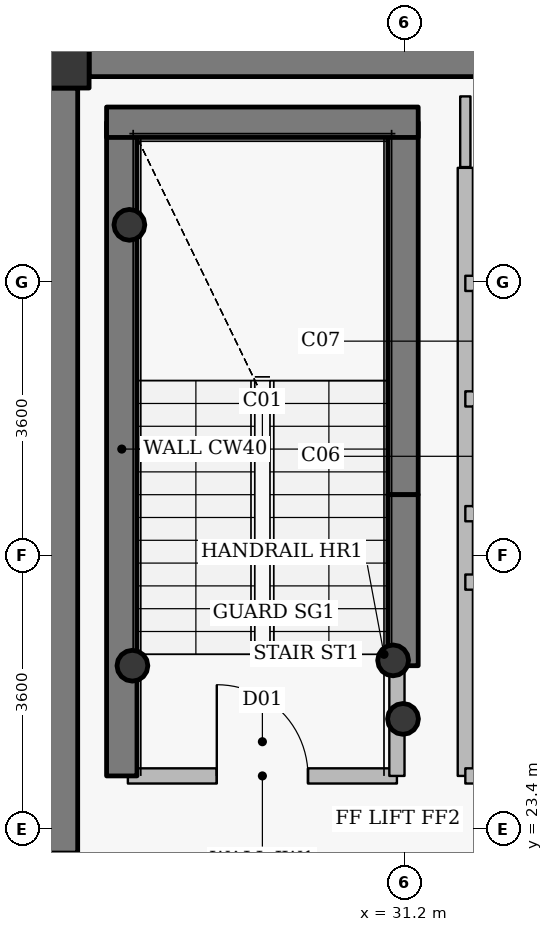
"""IFC4 building model, lengths in metres.
Left out: names, types, materials, properties, quantities, classifications, styles, units other than length and angle.
Written with IfcOpenShell. Run it as: python <this file> out.ifc"""

import sys

from ifc_helpers import new_model, si_unit, direction, frame, frame_2d, origin, origin_2d, place, context, subcontext, project, spatial, rectangle, hollow_circle, extrude, source, transform, mapped, element, fill, save


model = new_model("IFC4")
c1 = context("Model", 3, precision=1e-05, world=origin(), true_north=direction((0.0, 1.0)))
c2 = subcontext(c1, "Body", "Model", "MODEL_VIEW")
j1 = project(units=[si_unit("LENGTHUNIT", "METRE"), si_unit("PLANEANGLEUNIT", "RADIAN")], contexts=[c1])
p1 = place(None, origin())
s1 = spatial("IfcSite", under=j1, at=p1, CompositionType="ELEMENT")
p2 = place(p1, origin())
s2 = spatial("IfcBuilding", under=s1, at=p2, CompositionType="ELEMENT")
p3 = place(p2, frame((0.0, 0.0, 210.3)))
s3 = spatial("IfcBuildingStorey", under=s2, at=p3, CompositionType="ELEMENT", Elevation=210.3)
p4 = place(p3, frame((26.55, 33.65, 0.0), z_axis=(0.0, 0.0, 1.0), x_axis=(1.0, 0.0, 0.0)))
e1 = element("IfcColumn", 1, at=p4, inside=s3, PredefinedType="COLUMN", context=c2, shape_type="SweptSolid", body=[
    extrude(rectangle(XDim=1.0, YDim=1.0, at=origin_2d()), origin(), (0.0, 0.0, 1.0), 3.75),
])
p5 = place(p3, frame((27.48, 24.1, 0.0), z_axis=(0.0, 0.0, 1.0), x_axis=(0.0, 1.0, 0.0)))
e2 = element("IfcWall", 2, at=p5, inside=s3, PredefinedType="SHEAR", context=c2, shape_type="SweptSolid", body=[
    extrude(rectangle(XDim=8.6, YDim=0.4, at=frame_2d((4.3, 0.0))), origin(), (0.0, 0.0, 1.0), 3.75),
])
p6 = place(p3, frame((31.18, 27.8, 0.0), z_axis=(0.0, 0.0, 1.0), x_axis=(0.0, 1.0, 0.0)))
e3 = element("IfcWall", 3, at=p6, inside=s3, PredefinedType="SHEAR", context=c2, shape_type="SweptSolid", body=[
    extrude(rectangle(XDim=4.9, YDim=0.4, at=frame_2d((2.45, 0.0))), origin(), (0.0, 0.0, 1.0), 3.75),
])
p7 = place(p3, frame((27.28, 32.7, 0.0), z_axis=(0.0, 0.0, 1.0), x_axis=(1.0, 0.0, 0.0)))
e4 = element("IfcWall", 4, at=p7, inside=s3, PredefinedType="SHEAR", context=c2, shape_type="SweptSolid", body=[
    extrude(rectangle(XDim=4.1, YDim=0.4, at=frame_2d((2.05, 0.0))), origin(), (0.0, 0.0, 1.0), 3.75),
])
for number, where, z_axis, x_axis in (
    (5, (27.58, 31.35, 0.0), (0.0, 0.0, 1.0), (1.0, 0.0, 0.0)),
    (6, (31.05, 25.62, 0.0), (0.0, 0.0, 1.0), (1.0, 0.0, 0.0)),
    (7, (31.18, 24.85, 0.0), (0.0, 0.0, 1.0), (1.0, 0.0, 0.0)),
    (8, (27.62, 25.55, 0.0), (0.0, 0.0, 1.0), (1.0, 0.0, 0.0)),
):
    element("IfcColumn", number, at=place(p3, frame(where, z_axis=z_axis, x_axis=x_axis)), inside=s3, PredefinedType="COLUMN", context=c2, shape_type="SweptSolid", body=[
        extrude(hollow_circle(Radius=0.203, WallThickness=0.016, at=origin_2d()), origin(), (0.0, 0.0, 1.0), 3.75),
    ])
p8 = place(p3, frame((27.05, 33.65, 0.0), z_axis=(0.0, 0.0, 1.0), x_axis=(1.0, 0.0, 0.0)))
e9 = element("IfcWall", 9, at=p8, inside=s3, PredefinedType="SHEAR", context=c2, shape_type="SweptSolid", body=[
    extrude(rectangle(XDim=17.9, YDim=0.7, at=frame_2d((8.95, 0.0))), origin(), (0.0, 0.0, 1.0), 3.05),
])
p9 = place(p8, frame((13.675, 0.0, 0.0)))
e10 = element("IfcOpeningElement", 10, at=p9, cuts=e9, PredefinedType="OPENING", context=c2, shape_type="SweptSolid", body=[
    extrude(rectangle(XDim=1.15, YDim=2.15, at=origin_2d()), frame((0.575, 0.36, 1.075), z_axis=(0.0, -1.0, 0.0), x_axis=(1.0, 0.0, 0.0)), (0.0, 0.0, 1.0), 0.72),
])
p10 = place(p3, frame((26.55, 20.85, 0.0), z_axis=(0.0, 0.0, 1.0), x_axis=(0.0, 1.0, 0.0)))
e11 = element("IfcWall", 11, at=p10, inside=s3, PredefinedType="SHEAR", context=c2, shape_type="SweptSolid", body=[
    extrude(rectangle(XDim=12.3, YDim=0.7, at=frame_2d((6.15, 0.0))), origin(), (0.0, 0.0, 1.0), 3.05),
])
p11 = place(p10, frame((1.085, 0.0, 0.0)))
e12 = element("IfcOpeningElement", 12, at=p11, cuts=e11, PredefinedType="OPENING", context=c2, shape_type="SweptSolid", body=[
    extrude(rectangle(XDim=1.15, YDim=2.15, at=origin_2d()), frame((0.575, 0.36, 1.075), z_axis=(0.0, -1.0, 0.0), x_axis=(1.0, 0.0, 0.0)), (0.0, 0.0, 1.0), 0.72),
])
p12 = place(p3, frame((31.18, 25.55, 0.0), z_axis=(0.0, 0.0, 1.0), x_axis=(0.0, 1.0, 0.0)))
e13 = element("IfcWall", 13, at=p12, inside=s3, PredefinedType="SHEAR", context=c2, shape_type="SweptSolid", body=[
    extrude(rectangle(XDim=2.25, YDim=0.4, at=frame_2d((1.125, 0.0))), origin(), (0.0, 0.0, 1.0), 3.1),
])
p13 = place(p3, frame((27.56, 24.1, 0.0), z_axis=(0.0, 0.0, 1.0), x_axis=(1.0, 0.0, 0.0)))
e14 = element("IfcWall", 14, at=p13, inside=s3, PredefinedType="PARTITIONING", context=c2, shape_type="SweptSolid", body=[
    extrude(rectangle(XDim=3.54, YDim=0.2, at=frame_2d((1.77, 0.0))), origin(), (0.0, 0.0, 1.0), 3.5),
])
p14 = place(p13, frame((1.17, 0.0, 0.0)))
e15 = element("IfcOpeningElement", 15, at=p14, cuts=e14, PredefinedType="OPENING", context=c2, shape_type="SweptSolid", body=[
    extrude(rectangle(XDim=1.2, YDim=2.15, at=origin_2d()), frame((0.6, 0.11, 1.075), z_axis=(0.0, -1.0, 0.0), x_axis=(1.0, 0.0, 0.0)), (0.0, 0.0, 1.0), 0.22),
])
p15 = place(p3, frame((31.1, 24.1, 0.0), z_axis=(0.0, 0.0, 1.0), x_axis=(0.0, 1.0, 0.0)))
e16 = element("IfcWall", 16, at=p15, inside=s3, PredefinedType="PARTITIONING", context=c2, shape_type="SweptSolid", body=[
    extrude(rectangle(XDim=1.44, YDim=0.2, at=frame_2d((0.72, 0.0))), origin(), (0.0, 0.0, 1.0), 3.5),
])
p16 = place(p3, frame((32.0, 24.1, 0.0), z_axis=(0.0, 0.0, 1.0), x_axis=(0.0, 1.0, 0.0)))
e17 = element("IfcWall", 17, at=p16, inside=s3, PredefinedType="PARTITIONING", context=c2, shape_type="SweptSolid", body=[
    extrude(rectangle(XDim=8.0, YDim=0.2, at=frame_2d((4.0, 0.0))), origin(), (0.0, 0.0, 1.0), 3.5),
])
p17 = place(p3, frame((32.0, 24.1, 0.0), z_axis=(0.0, 0.0, 1.0), x_axis=(1.0, 0.0, 0.0)))
e18 = element("IfcWall", 18, at=p17, inside=s3, PredefinedType="PARTITIONING", context=c2, shape_type="SweptSolid", body=[
    extrude(rectangle(XDim=1.9, YDim=0.2, at=frame_2d((0.95, 0.0))), origin(), (0.0, 0.0, 1.0), 3.085),
])
p18 = place(p17, frame((0.375, 0.0, 0.0)))
e19 = element("IfcOpeningElement", 19, at=p18, cuts=e18, PredefinedType="OPENING", context=c2, shape_type="SweptSolid", body=[
    extrude(rectangle(XDim=1.15, YDim=2.15, at=origin_2d()), frame((0.575, 0.11, 1.075), z_axis=(0.0, -1.0, 0.0), x_axis=(1.0, 0.0, 0.0)), (0.0, 0.0, 1.0), 0.22),
])
for number, where, z_axis, x_axis in (
    (20, (32.0, 26.65, 0.0), (0.0, 0.0, 1.0), (1.0, 0.0, 0.0)),
    (21, (32.0, 27.55, 0.0), (0.0, 0.0, 1.0), (1.0, 0.0, 0.0)),
    (22, (32.0, 29.06, 0.0), (0.0, 0.0, 1.0), (1.0, 0.0, 0.0)),
    (23, (32.0, 30.58, 0.0), (0.0, 0.0, 1.0), (1.0, 0.0, 0.0)),
):
    element("IfcWall", number, at=place(p3, frame(where, z_axis=z_axis, x_axis=x_axis)), inside=s3, PredefinedType="PARTITIONING", context=c2, shape_type="SweptSolid", body=[
        extrude(rectangle(XDim=1.9, YDim=0.2, at=frame_2d((0.95, 0.0))), origin(), (0.0, 0.0, 1.0), 3.085),
    ])
p19 = place(p3, frame((32.0, 33.04, 0.0), z_axis=(0.0, 0.0, 1.0), x_axis=(0.0, -1.0, 0.0)))
e24 = element("IfcWall", 24, at=p19, inside=s3, PredefinedType="PARTITIONING", context=c2, shape_type="SweptSolid", body=[
    extrude(rectangle(XDim=0.93, YDim=0.135, at=frame_2d((0.465, 0.0))), origin(), (0.0, 0.0, 1.0), 3.035),
])
m1 = source(origin(), c2, "Body", "SweptSolid", [
    extrude(rectangle(XDim=1.2, YDim=2.15, at=origin_2d()), frame((0.6, 0.025, 1.075), z_axis=(0.0, -1.0, 0.0), x_axis=(1.0, 0.0, 0.0)), (0.0, 0.0, 1.0), 0.05),
])
p20 = place(p14, origin())
e25 = element("IfcDoor", 25, at=p20, inside=s3, OperationType="SINGLE_SWING_RIGHT", PredefinedType="DOOR", context=c2, shape_type="MappedRepresentation", body=[
    mapped(m1, transform((0.0, 0.0, 0.0), x_axis=(1.0, 0.0, 0.0), y_axis=(0.0, 1.0, 0.0), z_axis=(0.0, 0.0, 1.0), scale=1.0)),
])
fill(e15, e25)
save(model, sys.argv[1])
